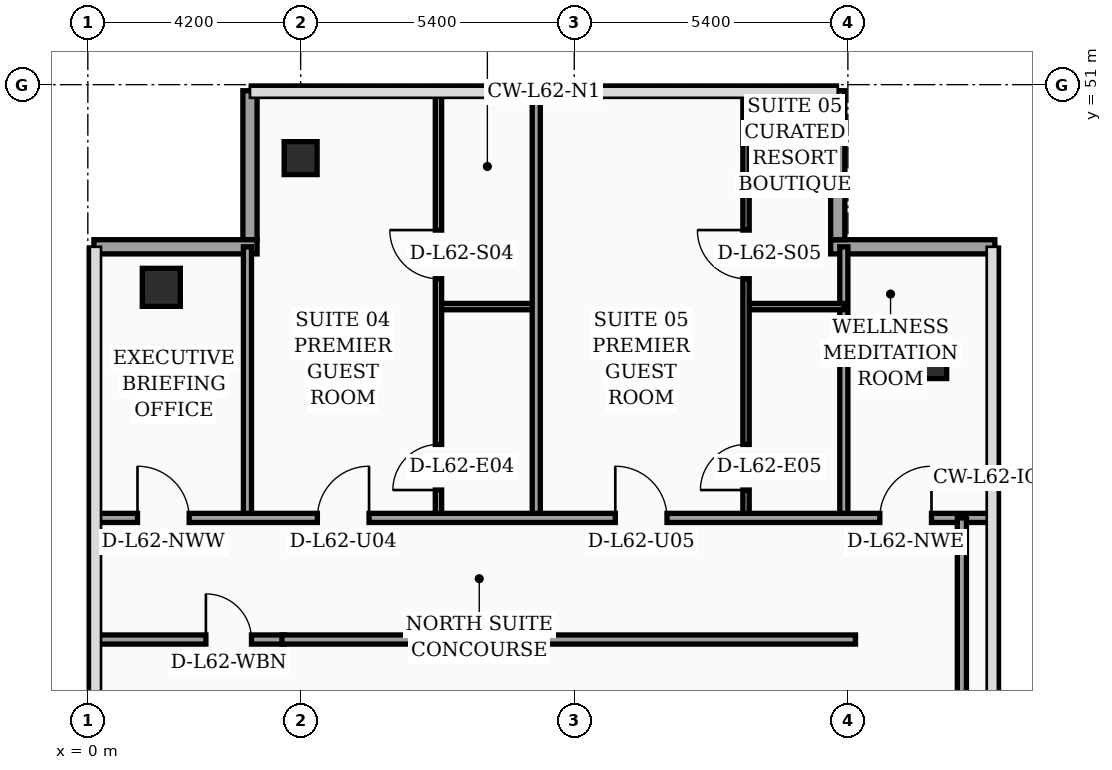
"""IFC4 building model, lengths in metres.
Left out: names, types, materials, properties, quantities, classifications, styles, units other than length and angle.
Written with IfcOpenShell. Run it as: python <this file> out.ifc"""

import sys

from ifc_helpers import new_model, si_unit, direction, frame, frame_2d, origin, origin_2d, place, context, subcontext, project, spatial, rectangle, hollow_rectangle, extrude, element, fill, save


model = new_model("IFC4")
c1 = context("Model", 3, precision=1e-05, world=origin(), true_north=direction((0.0, 1.0)))
c2 = subcontext(c1, "Body", "Model", "MODEL_VIEW")
j1 = project(units=[si_unit("LENGTHUNIT", "METRE"), si_unit("PLANEANGLEUNIT", "RADIAN")], contexts=[c1])
p1 = place(None, origin())
s1 = spatial("IfcSite", under=j1, at=p1, CompositionType="ELEMENT")
p2 = place(p1, origin())
s2 = spatial("IfcBuilding", under=s1, at=p2, CompositionType="ELEMENT")
p3 = place(p2, frame((0.0, 0.0, 251.4)))
s3 = spatial("IfcBuildingStorey", under=s2, at=p3, CompositionType="ELEMENT", Elevation=251.4)
p4 = place(p3, frame((1.45, 47.0, 0.0), z_axis=(0.0, 0.0, 1.0), x_axis=(1.0, 0.0, 0.0)))
e1 = element("IfcColumn", 1, at=p4, inside=s3, PredefinedType="COLUMN", context=c2, shape_type="SweptSolid", body=[
    extrude(hollow_rectangle(XDim=0.75, YDim=0.75, WallThickness=0.032, at=origin_2d()), origin(), (0.0, 0.0, 1.0), 3.56),
])
p5 = place(p3, frame((4.2, 49.55, 0.0), z_axis=(0.0, 0.0, 1.0), x_axis=(1.0, 0.0, 0.0)))
e2 = element("IfcColumn", 2, at=p5, inside=s3, PredefinedType="COLUMN", context=c2, shape_type="SweptSolid", body=[
    extrude(hollow_rectangle(XDim=0.65, YDim=0.65, WallThickness=0.028, at=origin_2d()), origin(), (0.0, 0.0, 1.0), 3.56),
])
p6 = place(p3, frame((16.55, 45.6, 0.0), z_axis=(0.0, 0.0, 1.0), x_axis=(1.0, 0.0, 0.0)))
e3 = element("IfcColumn", 3, at=p6, inside=s3, PredefinedType="COLUMN", context=c2, shape_type="SweptSolid", body=[
    extrude(rectangle(XDim=0.8, YDim=0.8, at=origin_2d()), origin(), (0.0, 0.0, 1.0), 3.56),
])
p7 = place(p3, frame((17.9, 47.8, 0.0), z_axis=(0.0, 0.0, 1.0), x_axis=(-1.0, 0.0, 0.0)))
e4 = element("IfcWall", 4, at=p7, inside=s3, PredefinedType="SOLIDWALL", context=c2, shape_type="SweptSolid", body=[
    extrude(rectangle(XDim=3.24, YDim=0.28, at=frame_2d((1.62, 0.0))), origin(), (0.0, 0.0, 1.0), 3.56),
])
p8 = place(p3, frame((14.8, 47.94, 0.0), z_axis=(0.0, 0.0, 1.0), x_axis=(0.0, 1.0, 0.0)))
e5 = element("IfcWall", 5, at=p8, inside=s3, PredefinedType="SOLIDWALL", context=c2, shape_type="SweptSolid", body=[
    extrude(rectangle(XDim=2.94, YDim=0.28, at=frame_2d((1.47, 0.0))), origin(), (0.0, 0.0, 1.0), 3.56),
])
p9 = place(p3, frame((3.2, 50.88, 0.0), z_axis=(0.0, 0.0, 1.0), x_axis=(0.0, -1.0, 0.0)))
e6 = element("IfcWall", 6, at=p9, inside=s3, PredefinedType="SOLIDWALL", context=c2, shape_type="SweptSolid", body=[
    extrude(rectangle(XDim=2.94, YDim=0.28, at=frame_2d((1.47, 0.0))), origin(), (0.0, 0.0, 1.0), 3.09),
])
p10 = place(p3, frame((3.34, 47.8, 0.0), z_axis=(0.0, 0.0, 1.0), x_axis=(-1.0, 0.0, 0.0)))
e7 = element("IfcWall", 7, at=p10, inside=s3, PredefinedType="SOLIDWALL", context=c2, shape_type="SweptSolid", body=[
    extrude(rectangle(XDim=3.22, YDim=0.28, at=frame_2d((1.61, 0.0))), origin(), (0.0, 0.0, 1.0), 3.09),
])
p11 = place(p3, frame((0.08, 40.05, 0.0), z_axis=(0.0, 0.0, 1.0), x_axis=(1.0, 0.0, 0.0)))
e8 = element("IfcWall", 8, at=p11, inside=s3, PredefinedType="PARTITIONING", context=c2, shape_type="SweptSolid", body=[
    extrude(rectangle(XDim=3.8, YDim=0.18, at=frame_2d((1.9, 0.0))), origin(), (0.0, 0.0, 1.0), 2.99),
])
p12 = place(p11, frame((2.25, 0.0, 0.0)))
e9 = element("IfcOpeningElement", 9, at=p12, cuts=e8, PredefinedType="OPENING", context=c2, shape_type="SweptSolid", body=[
    extrude(rectangle(XDim=0.9, YDim=2.15, at=frame_2d((0.45, 1.075))), frame((0.0, 0.1, 0.0), z_axis=(0.0, -1.0, 0.0), x_axis=(1.0, 0.0, 0.0)), (0.0, 0.0, 1.0), 0.2),
])
p13 = place(p3, frame((3.15, 42.45, 0.0), z_axis=(0.0, 0.0, 1.0), x_axis=(0.0, 1.0, 0.0)))
e10 = element("IfcWall", 10, at=p13, inside=s3, PredefinedType="PARTITIONING", context=c2, shape_type="SweptSolid", body=[
    extrude(rectangle(XDim=5.35, YDim=0.16, at=frame_2d((2.675, 0.0))), origin(), (0.0, 0.0, 1.0), 3.14),
])
p14 = place(p3, frame((14.92, 42.45, 0.0), z_axis=(0.0, 0.0, 1.0), x_axis=(0.0, 1.0, 0.0)))
e11 = element("IfcWall", 11, at=p14, inside=s3, PredefinedType="PARTITIONING", context=c2, shape_type="SweptSolid", body=[
    extrude(rectangle(XDim=5.35, YDim=0.16, at=frame_2d((2.675, 0.0))), origin(), (0.0, 0.0, 1.0), 3.09),
])
p15 = place(p3, frame((6.92, 46.62, 0.0), z_axis=(0.0, 0.0, 1.0), x_axis=(1.0, 0.0, 0.0)))
e12 = element("IfcWall", 12, at=p15, inside=s3, PredefinedType="PARTITIONING", context=c2, shape_type="SweptSolid", body=[
    extrude(rectangle(XDim=1.93, YDim=0.125, at=frame_2d((0.965, 0.0))), origin(), (0.0, 0.0, 1.0), 3.56),
])
p16 = place(p3, frame((6.92, 42.45, 0.0), z_axis=(0.0, 0.0, 1.0), x_axis=(0.0, 1.0, 0.0)))
e13 = element("IfcWall", 13, at=p16, inside=s3, PredefinedType="PARTITIONING", context=c2, shape_type="SweptSolid", body=[
    extrude(rectangle(XDim=8.49, YDim=0.125, at=frame_2d((4.245, 0.0))), origin(), (0.0, 0.0, 1.0), 3.09),
])
p17 = place(p16, frame((0.55, 0.0, 0.0)))
e14 = element("IfcOpeningElement", 14, at=p17, cuts=e13, PredefinedType="OPENING", context=c2, shape_type="SweptSolid", body=[
    extrude(rectangle(XDim=0.9, YDim=2.15, at=frame_2d((0.45, 1.075))), frame((0.0, 0.073, 0.0), z_axis=(0.0, -1.0, 0.0), x_axis=(1.0, 0.0, 0.0)), (0.0, 0.0, 1.0), 0.145),
])
p18 = place(p16, frame((4.72, 0.0, 0.0)))
e15 = element("IfcOpeningElement", 15, at=p18, cuts=e13, PredefinedType="OPENING", context=c2, shape_type="SweptSolid", body=[
    extrude(rectangle(XDim=0.96, YDim=2.2, at=frame_2d((0.48, 1.1))), frame((0.0, 0.073, 0.0), z_axis=(0.0, -1.0, 0.0), x_axis=(1.0, 0.0, 0.0)), (0.0, 0.0, 1.0), 0.145),
])
p19 = place(p3, frame((12.99, 46.62, 0.0), z_axis=(0.0, 0.0, 1.0), x_axis=(1.0, 0.0, 0.0)))
e16 = element("IfcWall", 16, at=p19, inside=s3, PredefinedType="PARTITIONING", context=c2, shape_type="SweptSolid", body=[
    extrude(rectangle(XDim=1.93, YDim=0.125, at=frame_2d((0.965, 0.0))), origin(), (0.0, 0.0, 1.0), 3.09),
])
p20 = place(p3, frame((12.99, 42.45, 0.0), z_axis=(0.0, 0.0, 1.0), x_axis=(0.0, 1.0, 0.0)))
e17 = element("IfcWall", 17, at=p20, inside=s3, PredefinedType="PARTITIONING", context=c2, shape_type="SweptSolid", body=[
    extrude(rectangle(XDim=8.49, YDim=0.125, at=frame_2d((4.245, 0.0))), origin(), (0.0, 0.0, 1.0), 3.09),
])
p21 = place(p20, frame((0.55, 0.0, 0.0)))
e18 = element("IfcOpeningElement", 18, at=p21, cuts=e17, PredefinedType="OPENING", context=c2, shape_type="SweptSolid", body=[
    extrude(rectangle(XDim=0.9, YDim=2.15, at=frame_2d((0.45, 1.075))), frame((0.0, 0.073, 0.0), z_axis=(0.0, -1.0, 0.0), x_axis=(1.0, 0.0, 0.0)), (0.0, 0.0, 1.0), 0.145),
])
p22 = place(p20, frame((4.72, 0.0, 0.0)))
e19 = element("IfcOpeningElement", 19, at=p22, cuts=e17, PredefinedType="OPENING", context=c2, shape_type="SweptSolid", body=[
    extrude(rectangle(XDim=0.96, YDim=2.2, at=frame_2d((0.48, 1.1))), frame((0.0, 0.073, 0.0), z_axis=(0.0, -1.0, 0.0), x_axis=(1.0, 0.0, 0.0)), (0.0, 0.0, 1.0), 0.145),
])
p23 = place(p3, frame((8.85, 42.45, 0.0), z_axis=(0.0, 0.0, 1.0), x_axis=(0.0, 1.0, 0.0)))
e20 = element("IfcWall", 20, at=p23, inside=s3, PredefinedType="PARTITIONING", context=c2, shape_type="SweptSolid", body=[
    extrude(rectangle(XDim=8.49, YDim=0.16, at=frame_2d((4.245, 0.0))), origin(), (0.0, 0.0, 1.0), 3.09),
])
p24 = place(p3, frame((0.08, 42.45, 0.0), z_axis=(0.0, 0.0, 1.0), x_axis=(1.0, 0.0, 0.0)))
e21 = element("IfcWall", 21, at=p24, inside=s3, PredefinedType="PARTITIONING", context=c2, shape_type="SweptSolid", body=[
    extrude(rectangle(XDim=17.77, YDim=0.18, at=frame_2d((8.885, 0.0))), origin(), (0.0, 0.0, 1.0), 2.99),
])
p25 = place(p24, frame((0.9, 0.0, 0.0)))
e22 = element("IfcOpeningElement", 22, at=p25, cuts=e21, PredefinedType="OPENING", context=c2, shape_type="SweptSolid", body=[
    extrude(rectangle(XDim=1.02, YDim=2.2, at=frame_2d((0.51, 1.1))), frame((0.0, 0.1, 0.0), z_axis=(0.0, -1.0, 0.0), x_axis=(1.0, 0.0, 0.0)), (0.0, 0.0, 1.0), 0.2),
])
p26 = place(p24, frame((4.45, 0.0, 0.0)))
e23 = element("IfcOpeningElement", 23, at=p26, cuts=e21, PredefinedType="OPENING", context=c2, shape_type="SweptSolid", body=[
    extrude(rectangle(XDim=1.02, YDim=2.2, at=frame_2d((0.51, 1.1))), frame((0.0, 0.1, 0.0), z_axis=(0.0, -1.0, 0.0), x_axis=(1.0, 0.0, 0.0)), (0.0, 0.0, 1.0), 0.2),
])
p27 = place(p24, frame((10.33, 0.0, 0.0)))
e24 = element("IfcOpeningElement", 24, at=p27, cuts=e21, PredefinedType="OPENING", context=c2, shape_type="SweptSolid", body=[
    extrude(rectangle(XDim=1.02, YDim=2.2, at=frame_2d((0.51, 1.1))), frame((0.0, 0.1, 0.0), z_axis=(0.0, -1.0, 0.0), x_axis=(1.0, 0.0, 0.0)), (0.0, 0.0, 1.0), 0.2),
])
p28 = place(p24, frame((15.55, 0.0, 0.0)))
e25 = element("IfcOpeningElement", 25, at=p28, cuts=e21, PredefinedType="OPENING", context=c2, shape_type="SweptSolid", body=[
    extrude(rectangle(XDim=1.02, YDim=2.2, at=frame_2d((0.51, 1.1))), frame((0.0, 0.1, 0.0), z_axis=(0.0, -1.0, 0.0), x_axis=(1.0, 0.0, 0.0)), (0.0, 0.0, 1.0), 0.2),
])
p29 = place(p3, frame((17.25, 24.3, 0.0), z_axis=(0.0, 0.0, 1.0), x_axis=(0.0, 1.0, 0.0)))
e26 = element("IfcWall", 26, at=p29, inside=s3, PredefinedType="PARTITIONING", context=c2, shape_type="SweptSolid", body=[
    extrude(rectangle(XDim=18.15, YDim=0.18, at=frame_2d((9.075, 0.0))), origin(), (0.0, 0.0, 1.0), 2.99),
])
p30 = place(p29, frame((3.2, 0.0, 0.0)))
e27 = element("IfcOpeningElement", 27, at=p30, cuts=e26, PredefinedType="OPENING", context=c2, shape_type="SweptSolid", body=[
    extrude(rectangle(XDim=1.02, YDim=2.2, at=frame_2d((0.51, 1.1))), frame((0.0, 0.1, 0.0), z_axis=(0.0, -1.0, 0.0), x_axis=(1.0, 0.0, 0.0)), (0.0, 0.0, 1.0), 0.2),
])
p31 = place(p3, frame((3.83, 40.05, 0.0), z_axis=(0.0, 0.0, 1.0), x_axis=(1.0, 0.0, 0.0)))
e28 = element("IfcWall", 28, at=p31, inside=s3, PredefinedType="PARTITIONING", context=c2, shape_type="SweptSolid", body=[
    extrude(rectangle(XDim=11.32, YDim=0.18, at=frame_2d((5.66, 0.0))), origin(), (0.0, 0.0, 1.0), 2.99),
])
p32 = place(p12, origin())
e29 = element("IfcDoor", 29, at=p32, inside=s3, OperationType="SINGLE_SWING_LEFT", PredefinedType="DOOR", context=c2, shape_type="SweptSolid", body=[
    extrude(rectangle(XDim=0.9, YDim=2.15, at=frame_2d((0.45, 1.075))), frame((0.0, 0.025, 0.0), z_axis=(0.0, -1.0, 0.0), x_axis=(1.0, 0.0, 0.0)), (0.0, 0.0, 1.0), 0.05),
])
fill(e9, e29)
p33 = place(p17, origin())
e30 = element("IfcDoor", 30, at=p33, inside=s3, OperationType="SINGLE_SWING_LEFT", PredefinedType="DOOR", context=c2, shape_type="SweptSolid", body=[
    extrude(rectangle(XDim=0.9, YDim=2.15, at=frame_2d((0.45, 1.075))), frame((0.0, 0.025, 0.0), z_axis=(0.0, -1.0, 0.0), x_axis=(1.0, 0.0, 0.0)), (0.0, 0.0, 1.0), 0.05),
])
fill(e14, e30)
p34 = place(p18, origin())
e31 = element("IfcDoor", 31, at=p34, inside=s3, OperationType="SINGLE_SWING_RIGHT", PredefinedType="DOOR", context=c2, shape_type="SweptSolid", body=[
    extrude(rectangle(XDim=0.96, YDim=2.2, at=frame_2d((0.48, 1.1))), frame((0.0, 0.025, 0.0), z_axis=(0.0, -1.0, 0.0), x_axis=(1.0, 0.0, 0.0)), (0.0, 0.0, 1.0), 0.05),
])
fill(e15, e31)
p35 = place(p21, origin())
e32 = element("IfcDoor", 32, at=p35, inside=s3, OperationType="SINGLE_SWING_LEFT", PredefinedType="DOOR", context=c2, shape_type="SweptSolid", body=[
    extrude(rectangle(XDim=0.9, YDim=2.15, at=frame_2d((0.45, 1.075))), frame((0.0, 0.025, 0.0), z_axis=(0.0, -1.0, 0.0), x_axis=(1.0, 0.0, 0.0)), (0.0, 0.0, 1.0), 0.05),
])
fill(e18, e32)
p36 = place(p22, origin())
e33 = element("IfcDoor", 33, at=p36, inside=s3, OperationType="SINGLE_SWING_RIGHT", PredefinedType="DOOR", context=c2, shape_type="SweptSolid", body=[
    extrude(rectangle(XDim=0.96, YDim=2.2, at=frame_2d((0.48, 1.1))), frame((0.0, 0.025, 0.0), z_axis=(0.0, -1.0, 0.0), x_axis=(1.0, 0.0, 0.0)), (0.0, 0.0, 1.0), 0.05),
])
fill(e19, e33)
p37 = place(p25, origin())
e34 = element("IfcDoor", 34, at=p37, inside=s3, OperationType="SINGLE_SWING_LEFT", PredefinedType="DOOR", context=c2, shape_type="SweptSolid", body=[
    extrude(rectangle(XDim=1.02, YDim=2.2, at=frame_2d((0.51, 1.1))), frame((0.0, 0.025, 0.0), z_axis=(0.0, -1.0, 0.0), x_axis=(1.0, 0.0, 0.0)), (0.0, 0.0, 1.0), 0.05),
])
fill(e22, e34)
p38 = place(p26, origin())
e35 = element("IfcDoor", 35, at=p38, inside=s3, OperationType="SINGLE_SWING_RIGHT", PredefinedType="DOOR", context=c2, shape_type="SweptSolid", body=[
    extrude(rectangle(XDim=1.02, YDim=2.2, at=frame_2d((0.51, 1.1))), frame((0.0, 0.025, 0.0), z_axis=(0.0, -1.0, 0.0), x_axis=(1.0, 0.0, 0.0)), (0.0, 0.0, 1.0), 0.05),
])
fill(e23, e35)
p39 = place(p27, origin())
e36 = element("IfcDoor", 36, at=p39, inside=s3, OperationType="SINGLE_SWING_LEFT", PredefinedType="DOOR", context=c2, shape_type="SweptSolid", body=[
    extrude(rectangle(XDim=1.02, YDim=2.2, at=frame_2d((0.51, 1.1))), frame((0.0, 0.025, 0.0), z_axis=(0.0, -1.0, 0.0), x_axis=(1.0, 0.0, 0.0)), (0.0, 0.0, 1.0), 0.05),
])
fill(e24, e36)
p40 = place(p28, origin())
e37 = element("IfcDoor", 37, at=p40, inside=s3, OperationType="SINGLE_SWING_RIGHT", PredefinedType="DOOR", context=c2, shape_type="SweptSolid", body=[
    extrude(rectangle(XDim=1.02, YDim=2.2, at=frame_2d((0.51, 1.1))), frame((0.0, 0.025, 0.0), z_axis=(0.0, -1.0, 0.0), x_axis=(1.0, 0.0, 0.0)), (0.0, 0.0, 1.0), 0.05),
])
fill(e25, e37)
save(model, sys.argv[1])
